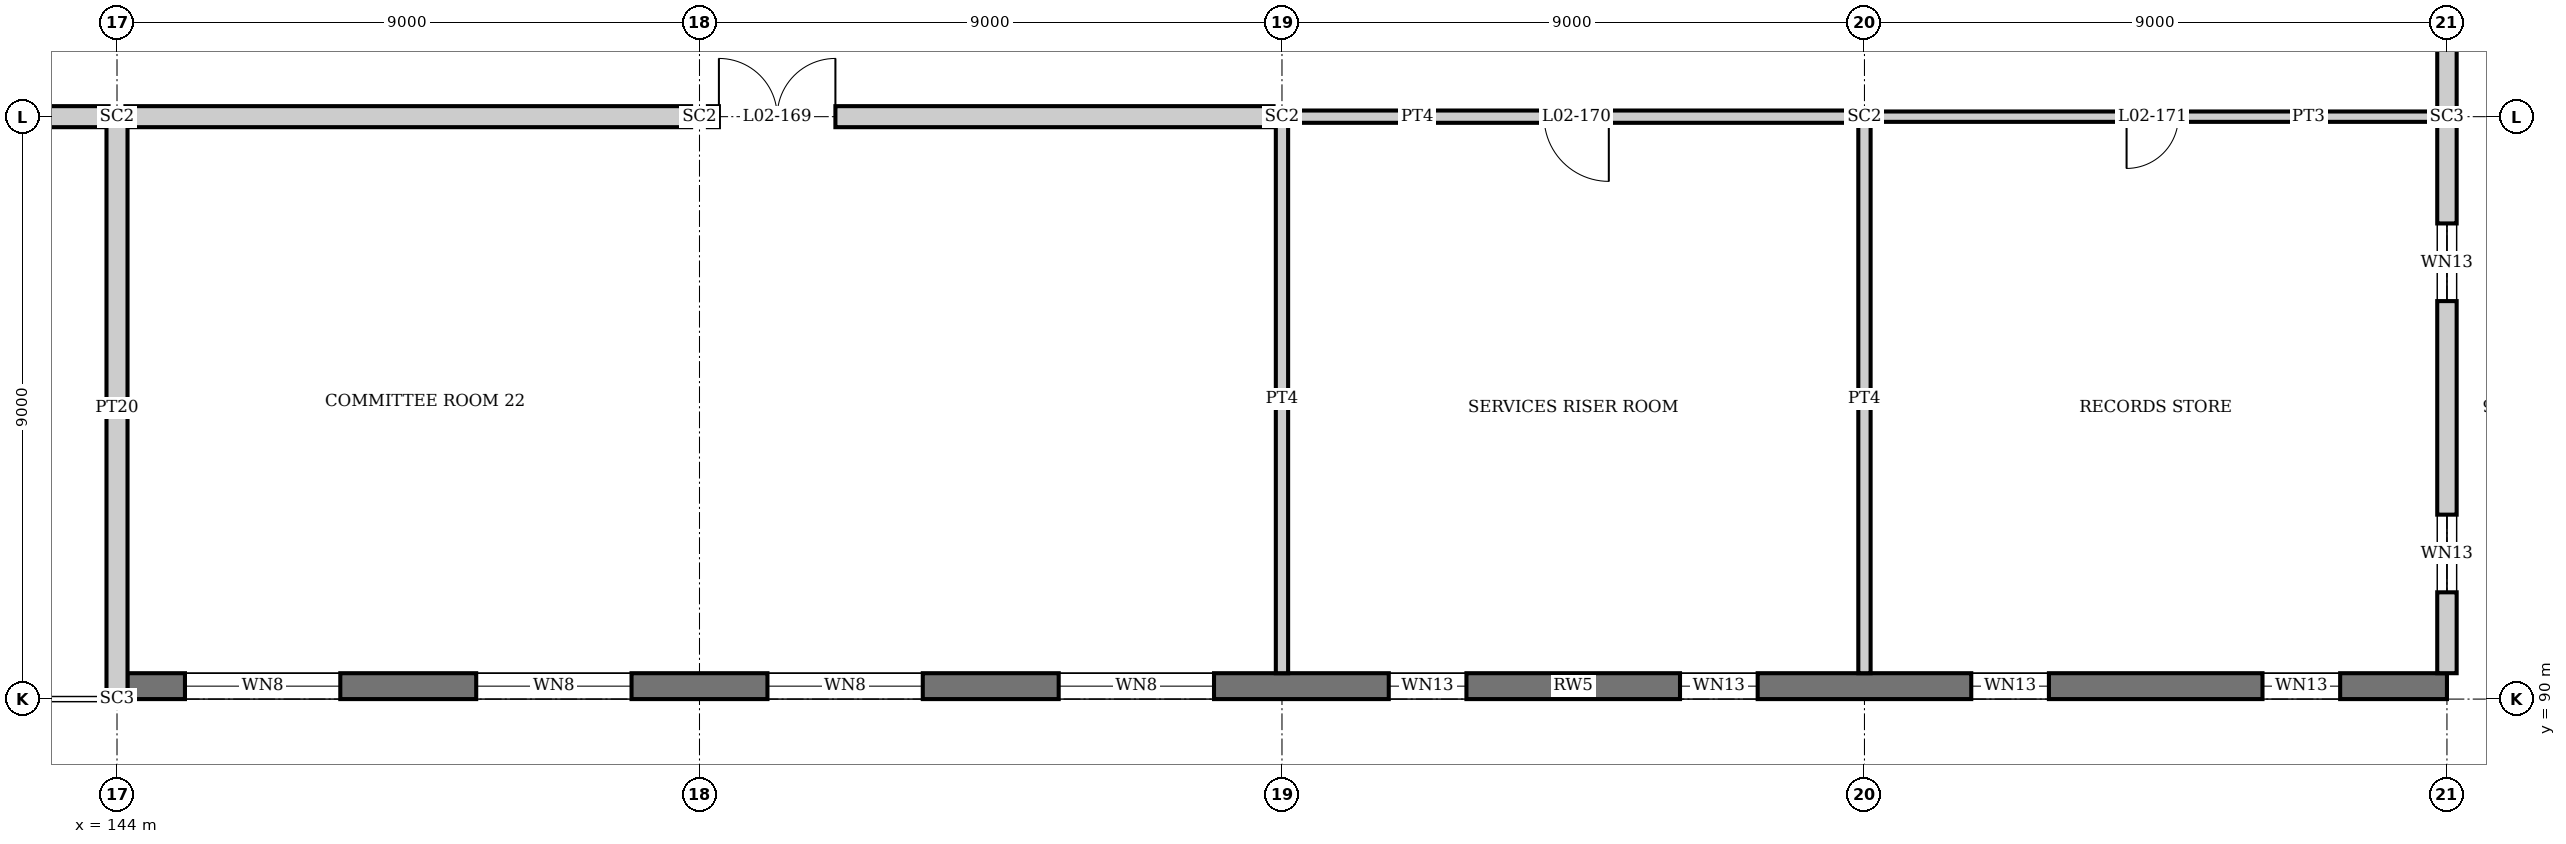
"""IFC4 building model, lengths in metres.
Left out: names, types, materials, properties, quantities, classifications, styles, units other than length and angle.
Written with IfcOpenShell. Run it as: python <this file> out.ifc"""

import sys

from ifc_helpers import new_model, si_unit, direction, frame, frame_2d, origin, origin_2d, place, context, subcontext, project, spatial, rectangle, i_section, extrude, element, fill, save


model = new_model("IFC4")
c1 = context("Model", 3, precision=1e-05, world=origin(), true_north=direction((0.0, 1.0)))
c2 = subcontext(c1, "Body", "Model", "MODEL_VIEW")
j1 = project(units=[si_unit("LENGTHUNIT", "METRE"), si_unit("PLANEANGLEUNIT", "RADIAN")], contexts=[c1])
p1 = place(None, origin())
s1 = spatial("IfcSite", under=j1, at=p1, CompositionType="ELEMENT")
p2 = place(p1, origin())
s2 = spatial("IfcBuilding", under=s1, at=p2, CompositionType="ELEMENT")
p3 = place(p2, frame((0.0, 0.0, 10.5)))
s3 = spatial("IfcBuildingStorey", under=s2, at=p3, CompositionType="ELEMENT", Elevation=10.5)
p4 = place(p3, frame((144.0, 90.0, 0.0), z_axis=(0.0, 0.0, 1.0), x_axis=(0.0, 1.0, 0.0)))
e1 = element("IfcColumn", 1, at=p4, inside=s3, PredefinedType="COLUMN", context=c2, shape_type="SweptSolid", body=[
    extrude(i_section(OverallWidth=0.254, OverallDepth=0.254, WebThickness=0.009, FlangeThickness=0.014, at=origin_2d()), origin(), (0.0, 0.0, 1.0), 4.5),
])
for number, where, z_axis, x_axis in (
    (2, (144.0, 99.0, 0.0), (0.0, 0.0, 1.0), (0.0, 1.0, 0.0)),
    (3, (153.0, 99.0, 0.0), (0.0, 0.0, 1.0), (0.0, 1.0, 0.0)),
    (4, (162.0, 99.0, 0.0), (0.0, 0.0, 1.0), (0.0, 1.0, 0.0)),
    (5, (171.0, 99.0, 0.0), (0.0, 0.0, 1.0), (0.0, 1.0, 0.0)),
):
    element("IfcColumn", number, at=place(p3, frame(where, z_axis=z_axis, x_axis=x_axis)), inside=s3, PredefinedType="COLUMN", context=c2, shape_type="SweptSolid", body=[
        extrude(i_section(OverallWidth=0.256, OverallDepth=0.26, WebThickness=0.01, FlangeThickness=0.017, at=origin_2d()), origin(), (0.0, 0.0, 1.0), 4.5),
    ])
p5 = place(p3, frame((180.0, 99.0, 0.0), z_axis=(0.0, 0.0, 1.0), x_axis=(0.0, 1.0, 0.0)))
e6 = element("IfcColumn", 6, at=p5, inside=s3, PredefinedType="COLUMN", context=c2, shape_type="SweptSolid", body=[
    extrude(i_section(OverallWidth=0.254, OverallDepth=0.254, WebThickness=0.009, FlangeThickness=0.014, at=origin_2d()), origin(), (0.0, 0.0, 1.0), 4.5),
])
p6 = place(p3, frame((144.16, 90.2, 0.0), z_axis=(0.0, 0.0, 1.0), x_axis=(1.0, 0.0, 0.0)))
e7 = element("IfcWall", 7, at=p6, inside=s3, PredefinedType="SHEAR", context=c2, shape_type="SweptSolid", body=[
    extrude(rectangle(XDim=35.84, YDim=0.4, at=frame_2d((17.92, 0.0))), origin(), (0.0, 0.0, 1.0), 4.35),
])
p7 = place(p6, frame((0.89, 0.0, 0.9)))
e8 = element("IfcOpeningElement", 8, at=p7, cuts=e7, PredefinedType="OPENING", context=c2, shape_type="SweptSolid", body=[
    extrude(rectangle(XDim=2.4, YDim=2.1, at=frame_2d((1.2, 1.05))), frame((0.0, 0.21, 0.0), z_axis=(0.0, -1.0, 0.0), x_axis=(1.0, 0.0, 0.0)), (0.0, 0.0, 1.0), 0.42),
])
p8 = place(p6, frame((5.39, 0.0, 0.9)))
e9 = element("IfcOpeningElement", 9, at=p8, cuts=e7, PredefinedType="OPENING", context=c2, shape_type="SweptSolid", body=[
    extrude(rectangle(XDim=2.4, YDim=2.1, at=frame_2d((1.2, 1.05))), frame((0.0, 0.21, 0.0), z_axis=(0.0, -1.0, 0.0), x_axis=(1.0, 0.0, 0.0)), (0.0, 0.0, 1.0), 0.42),
])
p9 = place(p6, frame((9.89, 0.0, 0.9)))
e10 = element("IfcOpeningElement", 10, at=p9, cuts=e7, PredefinedType="OPENING", context=c2, shape_type="SweptSolid", body=[
    extrude(rectangle(XDim=2.4, YDim=2.1, at=frame_2d((1.2, 1.05))), frame((0.0, 0.21, 0.0), z_axis=(0.0, -1.0, 0.0), x_axis=(1.0, 0.0, 0.0)), (0.0, 0.0, 1.0), 0.42),
])
p10 = place(p6, frame((14.39, 0.0, 0.9)))
e11 = element("IfcOpeningElement", 11, at=p10, cuts=e7, PredefinedType="OPENING", context=c2, shape_type="SweptSolid", body=[
    extrude(rectangle(XDim=2.4, YDim=2.1, at=frame_2d((1.2, 1.05))), frame((0.0, 0.21, 0.0), z_axis=(0.0, -1.0, 0.0), x_axis=(1.0, 0.0, 0.0)), (0.0, 0.0, 1.0), 0.42),
])
p11 = place(p6, frame((19.49, 0.0, 1.2)))
e12 = element("IfcOpeningElement", 12, at=p11, cuts=e7, PredefinedType="OPENING", context=c2, shape_type="SweptSolid", body=[
    extrude(rectangle(XDim=1.2, YDim=1.2, at=frame_2d((0.6, 0.6))), frame((0.0, 0.21, 0.0), z_axis=(0.0, -1.0, 0.0), x_axis=(1.0, 0.0, 0.0)), (0.0, 0.0, 1.0), 0.42),
])
p12 = place(p6, frame((23.99, 0.0, 1.2)))
e13 = element("IfcOpeningElement", 13, at=p12, cuts=e7, PredefinedType="OPENING", context=c2, shape_type="SweptSolid", body=[
    extrude(rectangle(XDim=1.2, YDim=1.2, at=frame_2d((0.6, 0.6))), frame((0.0, 0.21, 0.0), z_axis=(0.0, -1.0, 0.0), x_axis=(1.0, 0.0, 0.0)), (0.0, 0.0, 1.0), 0.42),
])
p13 = place(p6, frame((28.49, 0.0, 1.2)))
e14 = element("IfcOpeningElement", 14, at=p13, cuts=e7, PredefinedType="OPENING", context=c2, shape_type="SweptSolid", body=[
    extrude(rectangle(XDim=1.2, YDim=1.2, at=frame_2d((0.6, 0.6))), frame((0.0, 0.21, 0.0), z_axis=(0.0, -1.0, 0.0), x_axis=(1.0, 0.0, 0.0)), (0.0, 0.0, 1.0), 0.42),
])
p14 = place(p6, frame((32.99, 0.0, 1.2)))
e15 = element("IfcOpeningElement", 15, at=p14, cuts=e7, PredefinedType="OPENING", context=c2, shape_type="SweptSolid", body=[
    extrude(rectangle(XDim=1.2, YDim=1.2, at=frame_2d((0.6, 0.6))), frame((0.0, 0.21, 0.0), z_axis=(0.0, -1.0, 0.0), x_axis=(1.0, 0.0, 0.0)), (0.0, 0.0, 1.0), 0.42),
])
p15 = place(p3, frame((180.0, 90.4, 0.0), z_axis=(0.0, 0.0, 1.0), x_axis=(0.0, 1.0, 0.0)))
e16 = element("IfcWall", 16, at=p15, inside=s3, PredefinedType="SOLIDWALL", context=c2, shape_type="SweptSolid", body=[
    extrude(rectangle(XDim=8.473, YDim=0.3, at=frame_2d((4.237, 0.0))), origin(), (0.0, 0.0, 1.0), 3.991),
])
p16 = place(p15, frame((1.25, 0.0, 1.2)))
e17 = element("IfcOpeningElement", 17, at=p16, cuts=e16, PredefinedType="OPENING", context=c2, shape_type="SweptSolid", body=[
    extrude(rectangle(XDim=1.2, YDim=1.2, at=frame_2d((0.6, 0.6))), frame((0.0, 0.16, 0.0), z_axis=(0.0, -1.0, 0.0), x_axis=(1.0, 0.0, 0.0)), (0.0, 0.0, 1.0), 0.32),
])
p17 = place(p15, frame((5.75, 0.0, 1.2)))
e18 = element("IfcOpeningElement", 18, at=p17, cuts=e16, PredefinedType="OPENING", context=c2, shape_type="SweptSolid", body=[
    extrude(rectangle(XDim=1.2, YDim=1.2, at=frame_2d((0.6, 0.6))), frame((0.0, 0.16, 0.0), z_axis=(0.0, -1.0, 0.0), x_axis=(1.0, 0.0, 0.0)), (0.0, 0.0, 1.0), 0.32),
])
p18 = place(p3, frame((180.0, 99.127, 0.0), z_axis=(0.0, 0.0, 1.0), x_axis=(0.0, 1.0, 0.0)))
e19 = element("IfcWall", 19, at=p18, inside=s3, PredefinedType="SOLIDWALL", context=c2, shape_type="SweptSolid", body=[
    extrude(rectangle(XDim=8.873, YDim=0.3, at=frame_2d((4.437, 0.0))), origin(), (0.0, 0.0, 1.0), 3.991),
])
p19 = place(p18, frame((1.673, 0.0, 0.6)))
e20 = element("IfcOpeningElement", 20, at=p19, cuts=e19, PredefinedType="OPENING", context=c2, shape_type="SweptSolid", body=[
    extrude(rectangle(XDim=0.9, YDim=2.7, at=frame_2d((0.45, 1.35))), frame((0.0, 0.16, 0.0), z_axis=(0.0, -1.0, 0.0), x_axis=(1.0, 0.0, 0.0)), (0.0, 0.0, 1.0), 0.32),
])
p20 = place(p18, frame((6.173, 0.0, 0.6)))
e21 = element("IfcOpeningElement", 21, at=p20, cuts=e19, PredefinedType="OPENING", context=c2, shape_type="SweptSolid", body=[
    extrude(rectangle(XDim=0.9, YDim=2.7, at=frame_2d((0.45, 1.35))), frame((0.0, 0.16, 0.0), z_axis=(0.0, -1.0, 0.0), x_axis=(1.0, 0.0, 0.0)), (0.0, 0.0, 1.0), 0.32),
])
p21 = place(p3, frame((135.13, 99.0, 0.0), z_axis=(0.0, 0.0, 1.0), x_axis=(1.0, 0.0, 0.0)))
e22 = element("IfcWall", 22, at=p21, inside=s3, PredefinedType="PARTITIONING", context=c2, shape_type="SweptSolid", body=[
    extrude(rectangle(XDim=8.74, YDim=0.325, at=frame_2d((4.37, 0.0))), origin(), (0.0, 0.0, 1.0), 3.822),
])
p22 = place(p21, frame((0.17, 0.0, 0.0)))
e23 = element("IfcOpeningElement", 23, at=p22, cuts=e22, PredefinedType="OPENING", context=c2, shape_type="SweptSolid", body=[
    extrude(rectangle(XDim=1.8, YDim=2.4, at=frame_2d((0.9, 1.2))), frame((0.0, 0.172, 0.0), z_axis=(0.0, -1.0, 0.0), x_axis=(1.0, 0.0, 0.0)), (0.0, 0.0, 1.0), 0.345),
])
p23 = place(p3, frame((144.13, 99.0, 0.0), z_axis=(0.0, 0.0, 1.0), x_axis=(1.0, 0.0, 0.0)))
e24 = element("IfcWall", 24, at=p23, inside=s3, PredefinedType="PARTITIONING", context=c2, shape_type="SweptSolid", body=[
    extrude(rectangle(XDim=8.74, YDim=0.325, at=frame_2d((4.37, 0.0))), origin(), (0.0, 0.0, 1.0), 3.738),
])
p24 = place(p3, frame((153.13, 99.0, 0.0), z_axis=(0.0, 0.0, 1.0), x_axis=(1.0, 0.0, 0.0)))
e25 = element("IfcWall", 25, at=p24, inside=s3, PredefinedType="PARTITIONING", context=c2, shape_type="SweptSolid", body=[
    extrude(rectangle(XDim=8.74, YDim=0.325, at=frame_2d((4.37, 0.0))), origin(), (0.0, 0.0, 1.0), 3.738),
])
p25 = place(p24, frame((0.17, 0.0, 0.0)))
e26 = element("IfcOpeningElement", 26, at=p25, cuts=e25, PredefinedType="OPENING", context=c2, shape_type="SweptSolid", body=[
    extrude(rectangle(XDim=1.8, YDim=2.4, at=frame_2d((0.9, 1.2))), frame((0.0, 0.172, 0.0), z_axis=(0.0, -1.0, 0.0), x_axis=(1.0, 0.0, 0.0)), (0.0, 0.0, 1.0), 0.345),
])
p26 = place(p3, frame((162.13, 99.0, 0.0), z_axis=(0.0, 0.0, 1.0), x_axis=(1.0, 0.0, 0.0)))
e27 = element("IfcWall", 27, at=p26, inside=s3, PredefinedType="PARTITIONING", context=c2, shape_type="SweptSolid", body=[
    extrude(rectangle(XDim=8.74, YDim=0.19, at=frame_2d((4.37, 0.0))), origin(), (0.0, 0.0, 1.0), 3.738),
])
p27 = place(p26, frame((3.92, 0.0, 0.0)))
e28 = element("IfcOpeningElement", 28, at=p27, cuts=e27, PredefinedType="OPENING", context=c2, shape_type="SweptSolid", body=[
    extrude(rectangle(XDim=1.0, YDim=2.4, at=frame_2d((0.5, 1.2))), frame((0.0, 0.105, 0.0), z_axis=(0.0, -1.0, 0.0), x_axis=(1.0, 0.0, 0.0)), (0.0, 0.0, 1.0), 0.21),
])
p28 = place(p3, frame((171.13, 99.0, 0.0), z_axis=(0.0, 0.0, 1.0), x_axis=(1.0, 0.0, 0.0)))
e29 = element("IfcWall", 29, at=p28, inside=s3, PredefinedType="PARTITIONING", context=c2, shape_type="SweptSolid", body=[
    extrude(rectangle(XDim=8.743, YDim=0.16, at=frame_2d((4.372, 0.0))), origin(), (0.0, 0.0, 1.0), 3.822),
])
p29 = place(p28, frame((3.92, 0.0, 0.0)))
e30 = element("IfcOpeningElement", 30, at=p29, cuts=e29, PredefinedType="OPENING", context=c2, shape_type="SweptSolid", body=[
    extrude(rectangle(XDim=0.8, YDim=2.0, at=frame_2d((0.4, 1.0))), frame((0.0, 0.09, 0.0), z_axis=(0.0, -1.0, 0.0), x_axis=(1.0, 0.0, 0.0)), (0.0, 0.0, 1.0), 0.18),
])
p30 = place(p3, frame((144.0, 90.127, 0.0), z_axis=(0.0, 0.0, 1.0), x_axis=(0.0, 1.0, 0.0)))
e31 = element("IfcWall", 31, at=p30, inside=s3, PredefinedType="PARTITIONING", context=c2, shape_type="SweptSolid", body=[
    extrude(rectangle(XDim=8.743, YDim=0.325, at=frame_2d((4.372, 0.0))), origin(), (0.0, 0.0, 1.0), 3.998),
])
for number, where, z_axis, x_axis in (
    (32, (162.0, 90.4, 0.0), (0.0, 0.0, 1.0), (0.0, 1.0, 0.0)),
    (33, (171.0, 90.4, 0.0), (0.0, 0.0, 1.0), (0.0, 1.0, 0.0)),
):
    element("IfcWall", number, at=place(p3, frame(where, z_axis=z_axis, x_axis=x_axis)), inside=s3, PredefinedType="PARTITIONING", context=c2, shape_type="SweptSolid", body=[
        extrude(rectangle(XDim=8.47, YDim=0.19, at=frame_2d((4.235, 0.0))), origin(), (0.0, 0.0, 1.0), 4.043),
    ])
p31 = place(p16, origin())
e34 = element("IfcWindow", 34, at=p31, inside=s3, PartitioningType="SINGLE_PANEL", PredefinedType="WINDOW", context=c2, shape_type="SweptSolid", body=[
    extrude(rectangle(XDim=1.2, YDim=1.2, at=frame_2d((0.6, 0.6))), frame((0.0, 0.03, 0.0), z_axis=(0.0, -1.0, 0.0), x_axis=(1.0, 0.0, 0.0)), (0.0, 0.0, 1.0), 0.06),
])
fill(e17, e34)
p32 = place(p17, origin())
e35 = element("IfcWindow", 35, at=p32, inside=s3, PartitioningType="SINGLE_PANEL", PredefinedType="WINDOW", context=c2, shape_type="SweptSolid", body=[
    extrude(rectangle(XDim=1.2, YDim=1.2, at=frame_2d((0.6, 0.6))), frame((0.0, 0.03, 0.0), z_axis=(0.0, -1.0, 0.0), x_axis=(1.0, 0.0, 0.0)), (0.0, 0.0, 1.0), 0.06),
])
fill(e18, e35)
p33 = place(p7, origin())
e36 = element("IfcWindow", 36, at=p33, inside=s3, PartitioningType="SINGLE_PANEL", PredefinedType="WINDOW", context=c2, shape_type="SweptSolid", body=[
    extrude(rectangle(XDim=2.4, YDim=2.1, at=frame_2d((1.2, 1.05))), frame((0.0, 0.03, 0.0), z_axis=(0.0, -1.0, 0.0), x_axis=(1.0, 0.0, 0.0)), (0.0, 0.0, 1.0), 0.06),
])
fill(e8, e36)
p34 = place(p8, origin())
e37 = element("IfcWindow", 37, at=p34, inside=s3, PartitioningType="SINGLE_PANEL", PredefinedType="WINDOW", context=c2, shape_type="SweptSolid", body=[
    extrude(rectangle(XDim=2.4, YDim=2.1, at=frame_2d((1.2, 1.05))), frame((0.0, 0.03, 0.0), z_axis=(0.0, -1.0, 0.0), x_axis=(1.0, 0.0, 0.0)), (0.0, 0.0, 1.0), 0.06),
])
fill(e9, e37)
p35 = place(p9, origin())
e38 = element("IfcWindow", 38, at=p35, inside=s3, PartitioningType="SINGLE_PANEL", PredefinedType="WINDOW", context=c2, shape_type="SweptSolid", body=[
    extrude(rectangle(XDim=2.4, YDim=2.1, at=frame_2d((1.2, 1.05))), frame((0.0, 0.03, 0.0), z_axis=(0.0, -1.0, 0.0), x_axis=(1.0, 0.0, 0.0)), (0.0, 0.0, 1.0), 0.06),
])
fill(e10, e38)
p36 = place(p10, origin())
e39 = element("IfcWindow", 39, at=p36, inside=s3, PartitioningType="SINGLE_PANEL", PredefinedType="WINDOW", context=c2, shape_type="SweptSolid", body=[
    extrude(rectangle(XDim=2.4, YDim=2.1, at=frame_2d((1.2, 1.05))), frame((0.0, 0.03, 0.0), z_axis=(0.0, -1.0, 0.0), x_axis=(1.0, 0.0, 0.0)), (0.0, 0.0, 1.0), 0.06),
])
fill(e11, e39)
p37 = place(p11, origin())
e40 = element("IfcWindow", 40, at=p37, inside=s3, PartitioningType="SINGLE_PANEL", PredefinedType="WINDOW", context=c2, shape_type="SweptSolid", body=[
    extrude(rectangle(XDim=1.2, YDim=1.2, at=frame_2d((0.6, 0.6))), frame((0.0, 0.03, 0.0), z_axis=(0.0, -1.0, 0.0), x_axis=(1.0, 0.0, 0.0)), (0.0, 0.0, 1.0), 0.06),
])
fill(e12, e40)
p38 = place(p12, origin())
e41 = element("IfcWindow", 41, at=p38, inside=s3, PartitioningType="SINGLE_PANEL", PredefinedType="WINDOW", context=c2, shape_type="SweptSolid", body=[
    extrude(rectangle(XDim=1.2, YDim=1.2, at=frame_2d((0.6, 0.6))), frame((0.0, 0.03, 0.0), z_axis=(0.0, -1.0, 0.0), x_axis=(1.0, 0.0, 0.0)), (0.0, 0.0, 1.0), 0.06),
])
fill(e13, e41)
p39 = place(p13, origin())
e42 = element("IfcWindow", 42, at=p39, inside=s3, PartitioningType="SINGLE_PANEL", PredefinedType="WINDOW", context=c2, shape_type="SweptSolid", body=[
    extrude(rectangle(XDim=1.2, YDim=1.2, at=frame_2d((0.6, 0.6))), frame((0.0, 0.03, 0.0), z_axis=(0.0, -1.0, 0.0), x_axis=(1.0, 0.0, 0.0)), (0.0, 0.0, 1.0), 0.06),
])
fill(e14, e42)
p40 = place(p14, origin())
e43 = element("IfcWindow", 43, at=p40, inside=s3, PartitioningType="SINGLE_PANEL", PredefinedType="WINDOW", context=c2, shape_type="SweptSolid", body=[
    extrude(rectangle(XDim=1.2, YDim=1.2, at=frame_2d((0.6, 0.6))), frame((0.0, 0.03, 0.0), z_axis=(0.0, -1.0, 0.0), x_axis=(1.0, 0.0, 0.0)), (0.0, 0.0, 1.0), 0.06),
])
fill(e15, e43)
p41 = place(p25, origin())
e44 = element("IfcDoor", 44, at=p41, inside=s3, OperationType="DOUBLE_DOOR_SINGLE_SWING", PredefinedType="DOOR", context=c2, shape_type="SweptSolid", body=[
    extrude(rectangle(XDim=1.8, YDim=2.4, at=frame_2d((0.9, 1.2))), frame((0.0, 0.025, 0.0), z_axis=(0.0, -1.0, 0.0), x_axis=(1.0, 0.0, 0.0)), (0.0, 0.0, 1.0), 0.05),
])
fill(e26, e44)
p42 = place(p27, frame((1.0, 0.0, 0.0), z_axis=(0.0, 0.0, 1.0), x_axis=(-1.0, 0.0, 0.0)))
e45 = element("IfcDoor", 45, at=p42, inside=s3, OperationType="SINGLE_SWING_LEFT", PredefinedType="DOOR", context=c2, shape_type="SweptSolid", body=[
    extrude(rectangle(XDim=1.0, YDim=2.4, at=frame_2d((0.5, 1.2))), frame((0.0, 0.025, 0.0), z_axis=(0.0, -1.0, 0.0), x_axis=(1.0, 0.0, 0.0)), (0.0, 0.0, 1.0), 0.05),
])
fill(e28, e45)
p43 = place(p29, frame((0.8, 0.0, 0.0), z_axis=(0.0, 0.0, 1.0), x_axis=(-1.0, 0.0, 0.0)))
e46 = element("IfcDoor", 46, at=p43, inside=s3, OperationType="SINGLE_SWING_RIGHT", PredefinedType="DOOR", context=c2, shape_type="SweptSolid", body=[
    extrude(rectangle(XDim=0.8, YDim=2.0, at=frame_2d((0.4, 1.0))), frame((0.0, 0.025, 0.0), z_axis=(0.0, -1.0, 0.0), x_axis=(1.0, 0.0, 0.0)), (0.0, 0.0, 1.0), 0.05),
])
fill(e30, e46)
save(model, sys.argv[1])
